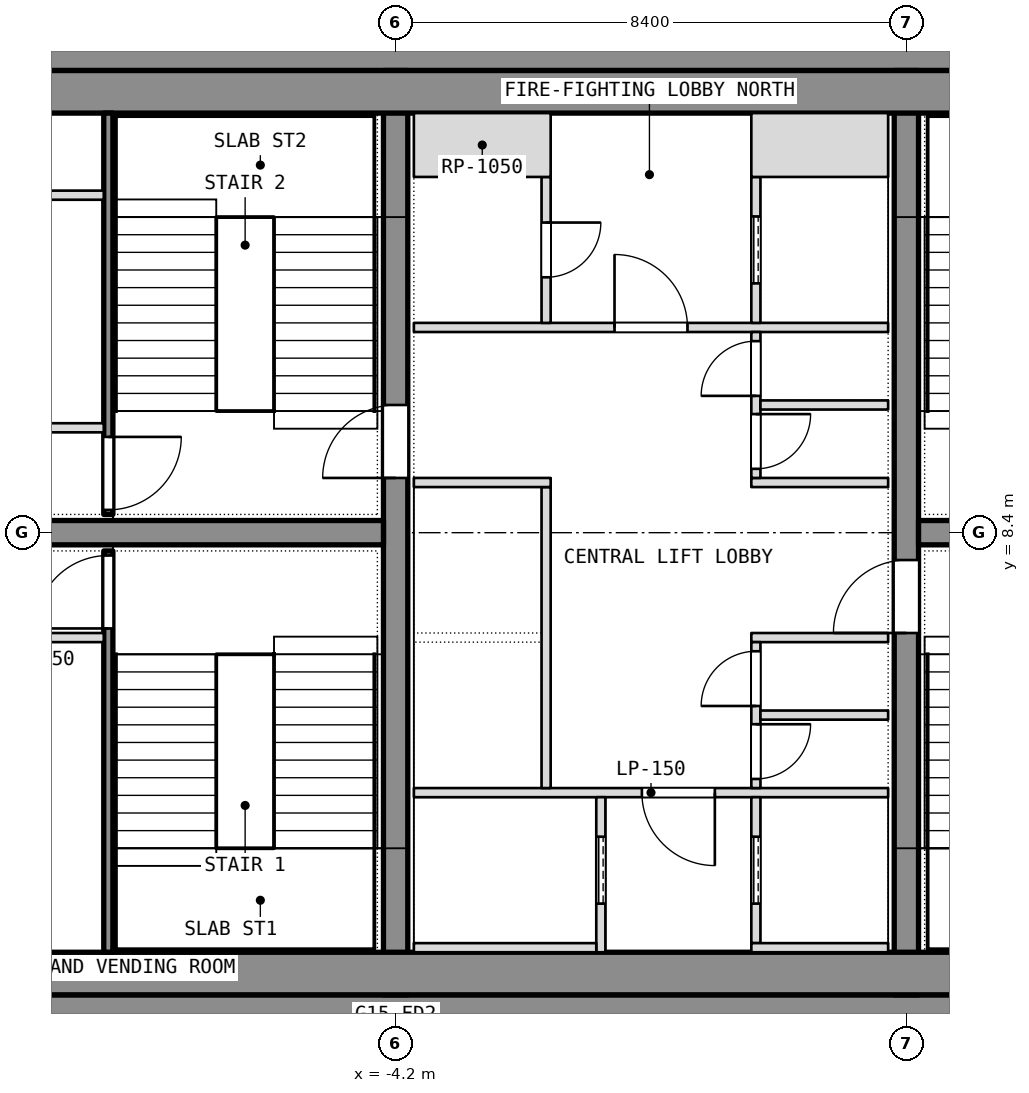
"""IFC4 building model, lengths in metres.
Left out: names, types, materials, properties, quantities, classifications, styles, units other than length and angle.
Written with IfcOpenShell. Run it as: python <this file> out.ifc"""

import sys

from ifc_helpers import new_model, si_unit, direction, frame, frame_2d, origin, place, context, subcontext, project, spatial, rectangle, extrude, element, fill, save


model = new_model("IFC4")
c1 = context("Model", 3, precision=1e-05, world=origin(), true_north=direction((0.0, 1.0)))
c2 = subcontext(c1, "Body", "Model", "MODEL_VIEW")
j1 = project(units=[si_unit("LENGTHUNIT", "METRE"), si_unit("PLANEANGLEUNIT", "RADIAN")], contexts=[c1])
p1 = place(None, origin())
s1 = spatial("IfcSite", under=j1, at=p1, CompositionType="ELEMENT")
p2 = place(p1, origin())
s2 = spatial("IfcBuilding", under=s1, at=p2, CompositionType="ELEMENT")
p3 = place(p2, frame((0.0, 0.0, 191.3)))
s3 = spatial("IfcBuildingStorey", under=s2, at=p3, CompositionType="ELEMENT", Elevation=191.3)
for number, where, z_axis, x_axis in (
    (1, (-11.1, 0.4, 0.0), (0.0, 0.0, 1.0), (1.0, 0.0, 0.0)),
    (2, (-11.1, 16.4, 0.0), (0.0, 0.0, 1.0), (1.0, 0.0, 0.0)),
):
    element("IfcWall", number, at=place(p3, frame(where, z_axis=z_axis, x_axis=x_axis)), inside=s3, PredefinedType="SHEAR", context=c2, shape_type="SweptSolid", body=[
        extrude(rectangle(XDim=22.2, YDim=0.8, at=frame_2d((11.1, 0.0))), origin(), (0.0, 0.0, 1.0), 3.6),
    ])
p4 = place(p3, frame((-4.2, 0.8, 0.0), z_axis=(0.0, 0.0, 1.0), x_axis=(0.0, 1.0, 0.0)))
e3 = element("IfcWall", 3, at=p4, inside=s3, PredefinedType="SHEAR", context=c2, shape_type="SweptSolid", body=[
    extrude(rectangle(XDim=15.2, YDim=0.4, at=frame_2d((7.6, 0.0))), origin(), (0.0, 0.0, 1.0), 3.6),
])
p5 = place(p4, frame((8.5, 0.0, 0.0)))
e4 = element("IfcOpeningElement", 4, at=p5, cuts=e3, PredefinedType="OPENING", context=c2, shape_type="SweptSolid", body=[
    extrude(rectangle(XDim=1.2, YDim=2.1, at=frame_2d((0.6, 1.05))), frame((0.0, 0.2, 0.0), z_axis=(0.0, -1.0, 0.0), x_axis=(1.0, 0.0, 0.0)), (0.0, 0.0, 1.0), 0.4),
])
p6 = place(p3, frame((4.2, 0.8, 0.0), z_axis=(0.0, 0.0, 1.0), x_axis=(0.0, 1.0, 0.0)))
e5 = element("IfcWall", 5, at=p6, inside=s3, PredefinedType="SHEAR", context=c2, shape_type="SweptSolid", body=[
    extrude(rectangle(XDim=15.2, YDim=0.4, at=frame_2d((7.6, 0.0))), origin(), (0.0, 0.0, 1.0), 3.6),
])
p7 = place(p6, frame((5.95, 0.0, 0.0)))
e6 = element("IfcOpeningElement", 6, at=p7, cuts=e5, PredefinedType="OPENING", context=c2, shape_type="SweptSolid", body=[
    extrude(rectangle(XDim=1.2, YDim=2.1, at=frame_2d((0.6, 1.05))), frame((0.0, 0.2, 0.0), z_axis=(0.0, -1.0, 0.0), x_axis=(1.0, 0.0, 0.0)), (0.0, 0.0, 1.0), 0.4),
])
for number, where, z_axis, x_axis in (
    (7, (-11.1, 8.4, 0.0), (0.0, 0.0, 1.0), (1.0, 0.0, 0.0)),
    (8, (4.4, 8.4, 0.0), (0.0, 0.0, 1.0), (1.0, 0.0, 0.0)),
):
    element("IfcWall", number, at=place(p3, frame(where, z_axis=z_axis, x_axis=x_axis)), inside=s3, PredefinedType="SHEAR", context=c2, shape_type="SweptSolid", body=[
        extrude(rectangle(XDim=6.7, YDim=0.4, at=frame_2d((3.35, 0.0))), origin(), (0.0, 0.0, 1.0), 3.6),
    ])
for number, where, z_axis, x_axis in (
    (9, (-11.1, 1.15, 0.0), (0.0, 0.0, 1.0), (1.0, 0.0, 0.0)),
    (10, (-11.1, 15.65, 0.0), (0.0, 0.0, 1.0), (1.0, 0.0, 0.0)),
):
    element("IfcWall", number, at=place(p3, frame(where, z_axis=z_axis, x_axis=x_axis)), inside=s3, PredefinedType="PARTITIONING", context=c2, shape_type="SweptSolid", body=[
        extrude(rectangle(XDim=22.2, YDim=0.7, at=frame_2d((11.1, 0.0))), origin(), (0.0, 0.0, 1.0), 3.34),
    ])
p8 = place(p3, frame((-8.925, 1.5, 0.0), z_axis=(0.0, 0.0, 1.0), x_axis=(0.0, 1.0, 0.0)))
e11 = element("IfcWall", 11, at=p8, inside=s3, PredefinedType="SHEAR", context=c2, shape_type="SweptSolid", body=[
    extrude(rectangle(XDim=6.6, YDim=0.15, at=frame_2d((3.3, 0.0))), origin(), (0.0, 0.0, 1.0), 3.34),
])
p9 = place(p8, frame((5.325, 0.0, 0.0)))
e12 = element("IfcOpeningElement", 12, at=p9, cuts=e11, PredefinedType="OPENING", context=c2, shape_type="SweptSolid", body=[
    extrude(rectangle(XDim=1.2, YDim=2.1, at=frame_2d((0.6, 1.05))), frame((0.0, 0.075, 0.0), z_axis=(0.0, -1.0, 0.0), x_axis=(1.0, 0.0, 0.0)), (0.0, 0.0, 1.0), 0.15),
])
p10 = place(p3, frame((-11.1, 6.675, 0.0), z_axis=(0.0, 0.0, 1.0), x_axis=(1.0, 0.0, 0.0)))
e13 = element("IfcWall", 13, at=p10, inside=s3, PredefinedType="PARTITIONING", context=c2, shape_type="SweptSolid", body=[
    extrude(rectangle(XDim=2.1, YDim=0.15, at=frame_2d((1.05, 0.0))), origin(), (0.0, 0.0, 1.0), 3.34),
])
p11 = place(p3, frame((-8.925, 8.7, 0.0), z_axis=(0.0, 0.0, 1.0), x_axis=(0.0, 1.0, 0.0)))
e14 = element("IfcWall", 14, at=p11, inside=s3, PredefinedType="SHEAR", context=c2, shape_type="SweptSolid", body=[
    extrude(rectangle(XDim=6.6, YDim=0.15, at=frame_2d((3.3, 0.0))), origin(), (0.0, 0.0, 1.0), 3.34),
])
p12 = place(p11, frame((0.075, 0.0, 0.0)))
e15 = element("IfcOpeningElement", 15, at=p12, cuts=e14, PredefinedType="OPENING", context=c2, shape_type="SweptSolid", body=[
    extrude(rectangle(XDim=1.2, YDim=2.1, at=frame_2d((0.6, 1.05))), frame((0.0, 0.075, 0.0), z_axis=(0.0, -1.0, 0.0), x_axis=(1.0, 0.0, 0.0)), (0.0, 0.0, 1.0), 0.15),
])
for number, where, z_axis, x_axis in (
    (16, (-11.1, 10.125, 0.0), (0.0, 0.0, 1.0), (1.0, 0.0, 0.0)),
    (17, (-11.1, 13.95, 0.0), (0.0, 0.0, 1.0), (1.0, 0.0, 0.0)),
):
    element("IfcWall", number, at=place(p3, frame(where, z_axis=z_axis, x_axis=x_axis)), inside=s3, PredefinedType="PARTITIONING", context=c2, shape_type="SweptSolid", body=[
        extrude(rectangle(XDim=2.1, YDim=0.15, at=frame_2d((1.05, 0.0))), origin(), (0.0, 0.0, 1.0), 3.34),
    ])
p13 = place(p3, frame((-3.9, 4.125, 0.0), z_axis=(0.0, 0.0, 1.0), x_axis=(1.0, 0.0, 0.0)))
e18 = element("IfcWall", 18, at=p13, inside=s3, PredefinedType="PARTITIONING", context=c2, shape_type="SweptSolid", body=[
    extrude(rectangle(XDim=7.8, YDim=0.15, at=frame_2d((3.9, 0.0))), origin(), (0.0, 0.0, 1.0), 3.34),
])
p14 = place(p13, frame((3.75, 0.0, 0.0)))
e19 = element("IfcOpeningElement", 19, at=p14, cuts=e18, PredefinedType="OPENING", context=c2, shape_type="SweptSolid", body=[
    extrude(rectangle(XDim=1.2, YDim=2.1, at=frame_2d((0.6, 1.05))), frame((0.0, 0.075, 0.0), z_axis=(0.0, -1.0, 0.0), x_axis=(1.0, 0.0, 0.0)), (0.0, 0.0, 1.0), 0.15),
])
p15 = place(p3, frame((-3.9, 11.775, 0.0), z_axis=(0.0, 0.0, 1.0), x_axis=(1.0, 0.0, 0.0)))
e20 = element("IfcWall", 20, at=p15, inside=s3, PredefinedType="PARTITIONING", context=c2, shape_type="SweptSolid", body=[
    extrude(rectangle(XDim=7.8, YDim=0.15, at=frame_2d((3.9, 0.0))), origin(), (0.0, 0.0, 1.0), 3.34),
])
p16 = place(p15, frame((3.3, 0.0, 0.0)))
e21 = element("IfcOpeningElement", 21, at=p16, cuts=e20, PredefinedType="OPENING", context=c2, shape_type="SweptSolid", body=[
    extrude(rectangle(XDim=1.2, YDim=2.1, at=frame_2d((0.6, 1.05))), frame((0.0, 0.075, 0.0), z_axis=(0.0, -1.0, 0.0), x_axis=(1.0, 0.0, 0.0)), (0.0, 0.0, 1.0), 0.15),
])
p17 = place(p3, frame((-0.825, 1.5, 0.0), z_axis=(0.0, 0.0, 1.0), x_axis=(0.0, 1.0, 0.0)))
e22 = element("IfcWall", 22, at=p17, inside=s3, PredefinedType="SHEAR", context=c2, shape_type="SweptSolid", body=[
    extrude(rectangle(XDim=2.55, YDim=0.15, at=frame_2d((1.275, 0.0))), origin(), (0.0, 0.0, 1.0), 3.6),
])
p18 = place(p17, frame((0.8, 0.0, 0.0)))
e23 = element("IfcOpeningElement", 23, at=p18, cuts=e22, PredefinedType="OPENING", context=c2, shape_type="SweptSolid", body=[
    extrude(rectangle(XDim=1.1, YDim=2.1, at=frame_2d((0.55, 1.05))), frame((0.0, 0.075, 0.0), z_axis=(0.0, -1.0, 0.0), x_axis=(1.0, 0.0, 0.0)), (0.0, 0.0, 1.0), 0.15),
])
p19 = place(p3, frame((-3.9, 1.575, 0.0), z_axis=(0.0, 0.0, 1.0), x_axis=(1.0, 0.0, 0.0)))
e24 = element("IfcWall", 24, at=p19, inside=s3, PredefinedType="SHEAR", context=c2, shape_type="SweptSolid", body=[
    extrude(rectangle(XDim=3.0, YDim=0.15, at=frame_2d((1.5, 0.0))), origin(), (0.0, 0.0, 1.0), 3.6),
])
p20 = place(p3, frame((-1.725, 4.2, 0.0), z_axis=(0.0, 0.0, 1.0), x_axis=(0.0, 1.0, 0.0)))
e25 = element("IfcWall", 25, at=p20, inside=s3, PredefinedType="SHEAR", context=c2, shape_type="SweptSolid", body=[
    extrude(rectangle(XDim=4.95, YDim=0.15, at=frame_2d((2.475, 0.0))), origin(), (0.0, 0.0, 1.0), 3.6),
])
p21 = place(p3, frame((-3.9, 9.225, 0.0), z_axis=(0.0, 0.0, 1.0), x_axis=(1.0, 0.0, 0.0)))
e26 = element("IfcWall", 26, at=p21, inside=s3, PredefinedType="SHEAR", context=c2, shape_type="SweptSolid", body=[
    extrude(rectangle(XDim=2.25, YDim=0.15, at=frame_2d((1.125, 0.0))), origin(), (0.0, 0.0, 1.0), 3.6),
])
p22 = place(p3, frame((-1.725, 11.85, 0.0), z_axis=(0.0, 0.0, 1.0), x_axis=(0.0, 1.0, 0.0)))
e27 = element("IfcWall", 27, at=p22, inside=s3, PredefinedType="PARTITIONING", context=c2, shape_type="SweptSolid", body=[
    extrude(rectangle(XDim=2.4, YDim=0.15, at=frame_2d((1.2, 0.0))), origin(), (0.0, 0.0, 1.0), 3.34),
])
p23 = place(p22, frame((0.75, 0.0, 0.0)))
e28 = element("IfcOpeningElement", 28, at=p23, cuts=e27, PredefinedType="OPENING", context=c2, shape_type="SweptSolid", body=[
    extrude(rectangle(XDim=0.9, YDim=2.1, at=frame_2d((0.45, 1.05))), frame((0.0, 0.075, 0.0), z_axis=(0.0, -1.0, 0.0), x_axis=(1.0, 0.0, 0.0)), (0.0, 0.0, 1.0), 0.15),
])
p24 = place(p3, frame((-3.9, 14.775, 0.0), z_axis=(0.0, 0.0, 1.0), x_axis=(1.0, 0.0, 0.0)))
e29 = element("IfcWall", 29, at=p24, inside=s3, PredefinedType="PARTITIONING", context=c2, shape_type="SweptSolid", body=[
    extrude(rectangle(XDim=2.25, YDim=1.05, at=frame_2d((1.125, 0.0))), origin(), (0.0, 0.0, 1.0), 3.34),
])
p25 = place(p3, frame((1.725, 1.65, 0.0), z_axis=(0.0, 0.0, 1.0), x_axis=(0.0, 1.0, 0.0)))
e30 = element("IfcWall", 30, at=p25, inside=s3, PredefinedType="SHEAR", context=c2, shape_type="SweptSolid", body=[
    extrude(rectangle(XDim=2.4, YDim=0.15, at=frame_2d((1.2, 0.0))), origin(), (0.0, 0.0, 1.0), 3.6),
])
p26 = place(p25, frame((0.65, 0.0, 0.0)))
e31 = element("IfcOpeningElement", 31, at=p26, cuts=e30, PredefinedType="OPENING", context=c2, shape_type="SweptSolid", body=[
    extrude(rectangle(XDim=1.1, YDim=2.1, at=frame_2d((0.55, 1.05))), frame((0.0, 0.075, 0.0), z_axis=(0.0, -1.0, 0.0), x_axis=(1.0, 0.0, 0.0)), (0.0, 0.0, 1.0), 0.15),
])
p27 = place(p3, frame((1.65, 1.575, 0.0), z_axis=(0.0, 0.0, 1.0), x_axis=(1.0, 0.0, 0.0)))
e32 = element("IfcWall", 32, at=p27, inside=s3, PredefinedType="SHEAR", context=c2, shape_type="SweptSolid", body=[
    extrude(rectangle(XDim=2.25, YDim=0.15, at=frame_2d((1.125, 0.0))), origin(), (0.0, 0.0, 1.0), 3.6),
])
p28 = place(p3, frame((1.725, 11.85, 0.0), z_axis=(0.0, 0.0, 1.0), x_axis=(0.0, 1.0, 0.0)))
e33 = element("IfcWall", 33, at=p28, inside=s3, PredefinedType="SHEAR", context=c2, shape_type="SweptSolid", body=[
    extrude(rectangle(XDim=2.4, YDim=0.15, at=frame_2d((1.2, 0.0))), origin(), (0.0, 0.0, 1.0), 3.6),
])
p29 = place(p28, frame((0.65, 0.0, 0.0)))
e34 = element("IfcOpeningElement", 34, at=p29, cuts=e33, PredefinedType="OPENING", context=c2, shape_type="SweptSolid", body=[
    extrude(rectangle(XDim=1.1, YDim=2.1, at=frame_2d((0.55, 1.05))), frame((0.0, 0.075, 0.0), z_axis=(0.0, -1.0, 0.0), x_axis=(1.0, 0.0, 0.0)), (0.0, 0.0, 1.0), 0.15),
])
p30 = place(p3, frame((1.65, 14.775, 0.0), z_axis=(0.0, 0.0, 1.0), x_axis=(1.0, 0.0, 0.0)))
e35 = element("IfcWall", 35, at=p30, inside=s3, PredefinedType="SHEAR", context=c2, shape_type="SweptSolid", body=[
    extrude(rectangle(XDim=2.25, YDim=1.05, at=frame_2d((1.125, 0.0))), origin(), (0.0, 0.0, 1.0), 3.6),
])
for number, where, z_axis, x_axis in (
    (36, (1.65, 6.675, 0.0), (0.0, 0.0, 1.0), (1.0, 0.0, 0.0)),
    (37, (1.65, 9.225, 0.0), (0.0, 0.0, 1.0), (1.0, 0.0, 0.0)),
):
    element("IfcWall", number, at=place(p3, frame(where, z_axis=z_axis, x_axis=x_axis)), inside=s3, PredefinedType="PARTITIONING", context=c2, shape_type="SweptSolid", body=[
        extrude(rectangle(XDim=2.25, YDim=0.15, at=frame_2d((1.125, 0.0))), origin(), (0.0, 0.0, 1.0), 3.34),
    ])
p31 = place(p3, frame((1.725, 4.2, 0.0), z_axis=(0.0, 0.0, 1.0), x_axis=(0.0, 1.0, 0.0)))
e38 = element("IfcWall", 38, at=p31, inside=s3, PredefinedType="PARTITIONING", context=c2, shape_type="SweptSolid", body=[
    extrude(rectangle(XDim=2.4, YDim=0.15, at=frame_2d((1.2, 0.0))), origin(), (0.0, 0.0, 1.0), 3.34),
])
p32 = place(p31, frame((0.15, 0.0, 0.0)))
e39 = element("IfcOpeningElement", 39, at=p32, cuts=e38, PredefinedType="OPENING", context=c2, shape_type="SweptSolid", body=[
    extrude(rectangle(XDim=0.9, YDim=2.1, at=frame_2d((0.45, 1.05))), frame((0.0, 0.075, 0.0), z_axis=(0.0, -1.0, 0.0), x_axis=(1.0, 0.0, 0.0)), (0.0, 0.0, 1.0), 0.15),
])
p33 = place(p31, frame((1.35, 0.0, 0.0)))
e40 = element("IfcOpeningElement", 40, at=p33, cuts=e38, PredefinedType="OPENING", context=c2, shape_type="SweptSolid", body=[
    extrude(rectangle(XDim=0.9, YDim=2.1, at=frame_2d((0.45, 1.05))), frame((0.0, 0.075, 0.0), z_axis=(0.0, -1.0, 0.0), x_axis=(1.0, 0.0, 0.0)), (0.0, 0.0, 1.0), 0.15),
])
p34 = place(p3, frame((1.725, 9.3, 0.0), z_axis=(0.0, 0.0, 1.0), x_axis=(0.0, 1.0, 0.0)))
e41 = element("IfcWall", 41, at=p34, inside=s3, PredefinedType="PARTITIONING", context=c2, shape_type="SweptSolid", body=[
    extrude(rectangle(XDim=2.4, YDim=0.15, at=frame_2d((1.2, 0.0))), origin(), (0.0, 0.0, 1.0), 3.34),
])
p35 = place(p34, frame((0.15, 0.0, 0.0)))
e42 = element("IfcOpeningElement", 42, at=p35, cuts=e41, PredefinedType="OPENING", context=c2, shape_type="SweptSolid", body=[
    extrude(rectangle(XDim=0.9, YDim=2.1, at=frame_2d((0.45, 1.05))), frame((0.0, 0.075, 0.0), z_axis=(0.0, -1.0, 0.0), x_axis=(1.0, 0.0, 0.0)), (0.0, 0.0, 1.0), 0.15),
])
p36 = place(p34, frame((1.35, 0.0, 0.0)))
e43 = element("IfcOpeningElement", 43, at=p36, cuts=e41, PredefinedType="OPENING", context=c2, shape_type="SweptSolid", body=[
    extrude(rectangle(XDim=0.9, YDim=2.1, at=frame_2d((0.45, 1.05))), frame((0.0, 0.075, 0.0), z_axis=(0.0, -1.0, 0.0), x_axis=(1.0, 0.0, 0.0)), (0.0, 0.0, 1.0), 0.15),
])
for number, where, z_axis, x_axis in (
    (44, (1.8, 5.4, 0.0), (0.0, 0.0, 1.0), (1.0, 0.0, 0.0)),
    (45, (1.8, 10.5, 0.0), (0.0, 0.0, 1.0), (1.0, 0.0, 0.0)),
):
    element("IfcWall", number, at=place(p3, frame(where, z_axis=z_axis, x_axis=x_axis)), inside=s3, PredefinedType="PARTITIONING", context=c2, shape_type="SweptSolid", body=[
        extrude(rectangle(XDim=2.1, YDim=0.15, at=frame_2d((1.05, 0.0))), origin(), (0.0, 0.0, 1.0), 3.34),
    ])
p37 = place(p9, origin())
e46 = element("IfcDoor", 46, at=p37, inside=s3, OperationType="SINGLE_SWING_LEFT", PredefinedType="DOOR", context=c2, shape_type="SweptSolid", body=[
    extrude(rectangle(XDim=1.2, YDim=2.1, at=frame_2d((0.6, 1.05))), frame((0.0, 0.025, 0.0), z_axis=(0.0, -1.0, 0.0), x_axis=(1.0, 0.0, 0.0)), (0.0, 0.0, 1.0), 0.05),
])
fill(e12, e46)
p38 = place(p12, origin())
e47 = element("IfcDoor", 47, at=p38, inside=s3, OperationType="SINGLE_SWING_LEFT", PredefinedType="DOOR", context=c2, shape_type="SweptSolid", body=[
    extrude(rectangle(XDim=1.2, YDim=2.1, at=frame_2d((0.6, 1.05))), frame((0.0, 0.025, 0.0), z_axis=(0.0, -1.0, 0.0), x_axis=(1.0, 0.0, 0.0)), (0.0, 0.0, 1.0), 0.05),
])
fill(e15, e47)
p39 = place(p32, origin())
e48 = element("IfcDoor", 48, at=p39, inside=s3, OperationType="SINGLE_SWING_LEFT", PredefinedType="DOOR", context=c2, shape_type="SweptSolid", body=[
    extrude(rectangle(XDim=0.9, YDim=2.1, at=frame_2d((0.45, 1.05))), frame((0.0, 0.025, 0.0), z_axis=(0.0, -1.0, 0.0), x_axis=(1.0, 0.0, 0.0)), (0.0, 0.0, 1.0), 0.05),
])
fill(e39, e48)
p40 = place(p33, origin())
e49 = element("IfcDoor", 49, at=p40, inside=s3, OperationType="SINGLE_SWING_LEFT", PredefinedType="DOOR", context=c2, shape_type="SweptSolid", body=[
    extrude(rectangle(XDim=0.9, YDim=2.1, at=frame_2d((0.45, 1.05))), frame((0.0, 0.025, 0.0), z_axis=(0.0, -1.0, 0.0), x_axis=(1.0, 0.0, 0.0)), (0.0, 0.0, 1.0), 0.05),
])
fill(e40, e49)
p41 = place(p35, origin())
e50 = element("IfcDoor", 50, at=p41, inside=s3, OperationType="SINGLE_SWING_LEFT", PredefinedType="DOOR", context=c2, shape_type="SweptSolid", body=[
    extrude(rectangle(XDim=0.9, YDim=2.1, at=frame_2d((0.45, 1.05))), frame((0.0, 0.025, 0.0), z_axis=(0.0, -1.0, 0.0), x_axis=(1.0, 0.0, 0.0)), (0.0, 0.0, 1.0), 0.05),
])
fill(e42, e50)
p42 = place(p36, origin())
e51 = element("IfcDoor", 51, at=p42, inside=s3, OperationType="SINGLE_SWING_LEFT", PredefinedType="DOOR", context=c2, shape_type="SweptSolid", body=[
    extrude(rectangle(XDim=0.9, YDim=2.1, at=frame_2d((0.45, 1.05))), frame((0.0, 0.025, 0.0), z_axis=(0.0, -1.0, 0.0), x_axis=(1.0, 0.0, 0.0)), (0.0, 0.0, 1.0), 0.05),
])
fill(e43, e51)
p43 = place(p18, origin())
e52 = element("IfcDoor", 52, at=p43, inside=s3, OperationType="SLIDING_TO_LEFT", PredefinedType="DOOR", context=c2, shape_type="SweptSolid", body=[
    extrude(rectangle(XDim=1.1, YDim=2.1, at=frame_2d((0.55, 1.05))), frame((0.0, 0.025, 0.0), z_axis=(0.0, -1.0, 0.0), x_axis=(1.0, 0.0, 0.0)), (0.0, 0.0, 1.0), 0.05),
])
fill(e23, e52)
p44 = place(p26, origin())
e53 = element("IfcDoor", 53, at=p44, inside=s3, OperationType="SLIDING_TO_LEFT", PredefinedType="DOOR", context=c2, shape_type="SweptSolid", body=[
    extrude(rectangle(XDim=1.1, YDim=2.1, at=frame_2d((0.55, 1.05))), frame((0.0, 0.025, 0.0), z_axis=(0.0, -1.0, 0.0), x_axis=(1.0, 0.0, 0.0)), (0.0, 0.0, 1.0), 0.05),
])
fill(e31, e53)
p45 = place(p29, origin())
e54 = element("IfcDoor", 54, at=p45, inside=s3, OperationType="SLIDING_TO_LEFT", PredefinedType="DOOR", context=c2, shape_type="SweptSolid", body=[
    extrude(rectangle(XDim=1.1, YDim=2.1, at=frame_2d((0.55, 1.05))), frame((0.0, 0.025, 0.0), z_axis=(0.0, -1.0, 0.0), x_axis=(1.0, 0.0, 0.0)), (0.0, 0.0, 1.0), 0.05),
])
fill(e34, e54)
p46 = place(p14, origin())
e55 = element("IfcDoor", 55, at=p46, inside=s3, OperationType="SINGLE_SWING_LEFT", PredefinedType="DOOR", context=c2, shape_type="SweptSolid", body=[
    extrude(rectangle(XDim=1.2, YDim=2.1, at=frame_2d((0.6, 1.05))), frame((0.0, 0.025, 0.0), z_axis=(0.0, -1.0, 0.0), x_axis=(1.0, 0.0, 0.0)), (0.0, 0.0, 1.0), 0.05),
])
fill(e19, e55)
p47 = place(p16, origin())
e56 = element("IfcDoor", 56, at=p47, inside=s3, OperationType="SINGLE_SWING_LEFT", PredefinedType="DOOR", context=c2, shape_type="SweptSolid", body=[
    extrude(rectangle(XDim=1.2, YDim=2.1, at=frame_2d((0.6, 1.05))), frame((0.0, 0.025, 0.0), z_axis=(0.0, -1.0, 0.0), x_axis=(1.0, 0.0, 0.0)), (0.0, 0.0, 1.0), 0.05),
])
fill(e21, e56)
p48 = place(p23, origin())
e57 = element("IfcDoor", 57, at=p48, inside=s3, OperationType="SINGLE_SWING_LEFT", PredefinedType="DOOR", context=c2, shape_type="SweptSolid", body=[
    extrude(rectangle(XDim=0.9, YDim=2.1, at=frame_2d((0.45, 1.05))), frame((0.0, 0.025, 0.0), z_axis=(0.0, -1.0, 0.0), x_axis=(1.0, 0.0, 0.0)), (0.0, 0.0, 1.0), 0.05),
])
fill(e28, e57)
p49 = place(p5, origin())
e58 = element("IfcDoor", 58, at=p49, inside=s3, OperationType="SINGLE_SWING_LEFT", PredefinedType="DOOR", context=c2, shape_type="SweptSolid", body=[
    extrude(rectangle(XDim=1.2, YDim=2.1, at=frame_2d((0.6, 1.05))), frame((0.0, 0.025, 0.0), z_axis=(0.0, -1.0, 0.0), x_axis=(1.0, 0.0, 0.0)), (0.0, 0.0, 1.0), 0.05),
])
fill(e4, e58)
p50 = place(p7, origin())
e59 = element("IfcDoor", 59, at=p50, inside=s3, OperationType="SINGLE_SWING_LEFT", PredefinedType="DOOR", context=c2, shape_type="SweptSolid", body=[
    extrude(rectangle(XDim=1.2, YDim=2.1, at=frame_2d((0.6, 1.05))), frame((0.0, 0.025, 0.0), z_axis=(0.0, -1.0, 0.0), x_axis=(1.0, 0.0, 0.0)), (0.0, 0.0, 1.0), 0.05),
])
fill(e6, e59)
save(model, sys.argv[1])
